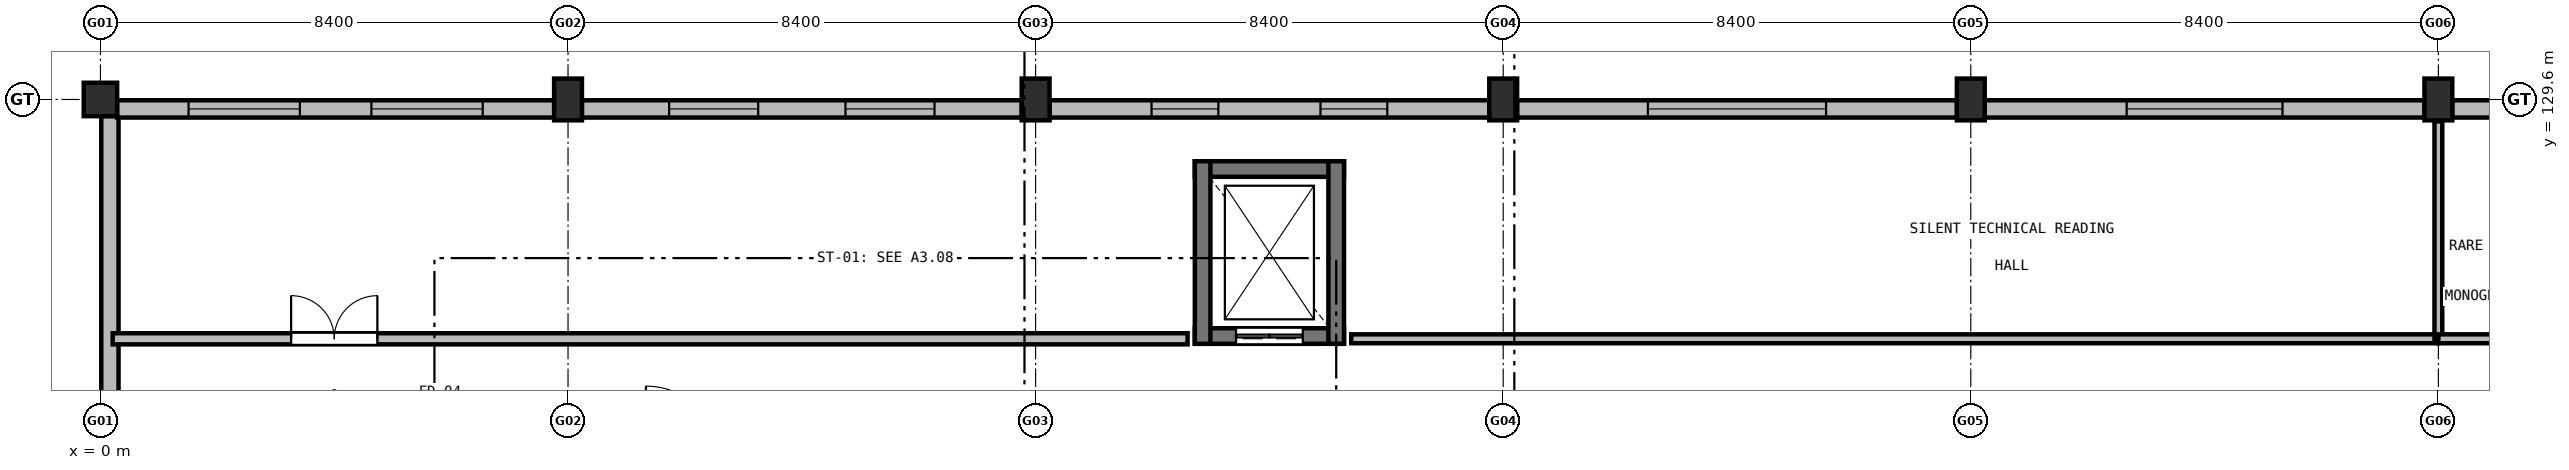
"""IFC4 building model, lengths in metres.
Left out: names, types, materials, properties, quantities, classifications, styles, units other than length and angle.
Written with IfcOpenShell. Run it as: python <this file> out.ifc"""

import sys

from ifc_helpers import new_model, si_unit, direction, frame, frame_2d, origin, origin_2d, place, context, subcontext, project, spatial, rectangle, extrude, element, fill, save


model = new_model("IFC4")
c1 = context("Model", 3, precision=1e-05, world=origin(), true_north=direction((0.0, 1.0)))
c2 = subcontext(c1, "Body", "Model", "MODEL_VIEW")
j1 = project(units=[si_unit("LENGTHUNIT", "METRE"), si_unit("PLANEANGLEUNIT", "RADIAN")], contexts=[c1])
p1 = place(None, origin())
s1 = spatial("IfcSite", under=j1, at=p1, CompositionType="ELEMENT")
p2 = place(p1, origin())
s2 = spatial("IfcBuilding", under=s1, at=p2, CompositionType="ELEMENT")
p3 = place(p2, frame((0.0, 0.0, 17.7)))
s3 = spatial("IfcBuildingStorey", under=s2, at=p3, CompositionType="ELEMENT", Elevation=17.7)
p4 = place(p3, frame((0.0, 129.6, 0.0), z_axis=(0.0, 0.0, 1.0), x_axis=(1.0, 0.0, 0.0)))
e1 = element("IfcColumn", 1, at=p4, inside=s3, PredefinedType="COLUMN", context=c2, shape_type="SweptSolid", body=[
    extrude(rectangle(XDim=0.6, YDim=0.6, at=origin_2d()), origin(), (0.0, 0.0, 1.0), 4.2),
])
for number, where, z_axis, x_axis in (
    (2, (8.4, 129.6, 0.0), (0.0, 0.0, 1.0), (1.0, 0.0, 0.0)),
    (3, (16.8, 129.6, 0.0), (0.0, 0.0, 1.0), (1.0, 0.0, 0.0)),
    (4, (25.2, 129.6, 0.0), (0.0, 0.0, 1.0), (1.0, 0.0, 0.0)),
    (5, (33.6, 129.6, 0.0), (0.0, 0.0, 1.0), (1.0, 0.0, 0.0)),
    (6, (42.0, 129.6, 0.0), (0.0, 0.0, 1.0), (1.0, 0.0, 0.0)),
):
    element("IfcColumn", number, at=place(p3, frame(where, z_axis=z_axis, x_axis=x_axis)), inside=s3, PredefinedType="COLUMN", context=c2, shape_type="SweptSolid", body=[
        extrude(rectangle(XDim=0.5, YDim=0.75, at=origin_2d()), origin(), (0.0, 0.0, 1.0), 4.2),
    ])
p5 = place(p3, frame((0.17, 122.698, 0.0), z_axis=(0.0, 0.0, 1.0), x_axis=(0.0, 1.0, 0.0)))
e7 = element("IfcWall", 7, at=p5, inside=s3, PredefinedType="SOLIDWALL", context=c2, shape_type="SweptSolid", body=[
    extrude(rectangle(XDim=6.604, YDim=0.31, at=frame_2d((3.302, 0.0))), origin(), (0.0, 0.0, 1.0), 3.36),
])
p6 = place(p3, frame((0.298, 129.43, 0.0), z_axis=(0.0, 0.0, 1.0), x_axis=(1.0, 0.0, 0.0)))
e8 = element("IfcWall", 8, at=p6, inside=s3, PredefinedType="SOLIDWALL", context=c2, shape_type="SweptSolid", body=[
    extrude(rectangle(XDim=7.854, YDim=0.31, at=frame_2d((3.927, 0.0))), origin(), (0.0, 0.0, 1.0), 3.25),
])
p7 = place(p6, frame((1.285, 0.0, 0.95)))
e9 = element("IfcOpeningElement", 9, at=p7, cuts=e8, PredefinedType="OPENING", context=c2, shape_type="SweptSolid", body=[
    extrude(rectangle(XDim=2.0, YDim=2.0, at=frame_2d((1.0, 1.0))), frame((0.0, 0.165, 0.0), z_axis=(0.0, -1.0, 0.0), x_axis=(1.0, 0.0, 0.0)), (0.0, 0.0, 1.0), 0.33),
])
p8 = place(p6, frame((4.569, 0.0, 0.95)))
e10 = element("IfcOpeningElement", 10, at=p8, cuts=e8, PredefinedType="OPENING", context=c2, shape_type="SweptSolid", body=[
    extrude(rectangle(XDim=2.0, YDim=2.0, at=frame_2d((1.0, 1.0))), frame((0.0, 0.165, 0.0), z_axis=(0.0, -1.0, 0.0), x_axis=(1.0, 0.0, 0.0)), (0.0, 0.0, 1.0), 0.33),
])
p9 = place(p3, frame((8.648, 129.43, 0.0), z_axis=(0.0, 0.0, 1.0), x_axis=(1.0, 0.0, 0.0)))
e11 = element("IfcWall", 11, at=p9, inside=s3, PredefinedType="SOLIDWALL", context=c2, shape_type="SweptSolid", body=[
    extrude(rectangle(XDim=7.904, YDim=0.31, at=frame_2d((3.952, 0.0))), origin(), (0.0, 0.0, 1.0), 3.25),
])
p10 = place(p9, frame((1.568, 0.0, 0.95)))
e12 = element("IfcOpeningElement", 12, at=p10, cuts=e11, PredefinedType="OPENING", context=c2, shape_type="SweptSolid", body=[
    extrude(rectangle(XDim=1.6, YDim=1.9, at=frame_2d((0.8, 0.95))), frame((0.0, 0.165, 0.0), z_axis=(0.0, -1.0, 0.0), x_axis=(1.0, 0.0, 0.0)), (0.0, 0.0, 1.0), 0.33),
])
p11 = place(p9, frame((4.736, 0.0, 0.95)))
e13 = element("IfcOpeningElement", 13, at=p11, cuts=e11, PredefinedType="OPENING", context=c2, shape_type="SweptSolid", body=[
    extrude(rectangle(XDim=1.6, YDim=1.9, at=frame_2d((0.8, 0.95))), frame((0.0, 0.165, 0.0), z_axis=(0.0, -1.0, 0.0), x_axis=(1.0, 0.0, 0.0)), (0.0, 0.0, 1.0), 0.33),
])
p12 = place(p3, frame((17.048, 129.43, 0.0), z_axis=(0.0, 0.0, 1.0), x_axis=(1.0, 0.0, 0.0)))
e14 = element("IfcWall", 14, at=p12, inside=s3, PredefinedType="SOLIDWALL", context=c2, shape_type="SweptSolid", body=[
    extrude(rectangle(XDim=7.904, YDim=0.31, at=frame_2d((3.952, 0.0))), origin(), (0.0, 0.0, 1.0), 3.25),
])
p13 = place(p12, frame((1.835, 0.0, 0.95)))
e15 = element("IfcOpeningElement", 15, at=p13, cuts=e14, PredefinedType="OPENING", context=c2, shape_type="SweptSolid", body=[
    extrude(rectangle(XDim=1.2, YDim=1.8, at=frame_2d((0.6, 0.9))), frame((0.0, 0.165, 0.0), z_axis=(0.0, -1.0, 0.0), x_axis=(1.0, 0.0, 0.0)), (0.0, 0.0, 1.0), 0.33),
])
p14 = place(p12, frame((4.869, 0.0, 0.95)))
e16 = element("IfcOpeningElement", 16, at=p14, cuts=e14, PredefinedType="OPENING", context=c2, shape_type="SweptSolid", body=[
    extrude(rectangle(XDim=1.2, YDim=1.8, at=frame_2d((0.6, 0.9))), frame((0.0, 0.165, 0.0), z_axis=(0.0, -1.0, 0.0), x_axis=(1.0, 0.0, 0.0)), (0.0, 0.0, 1.0), 0.33),
])
p15 = place(p3, frame((25.448, 129.43, 0.0), z_axis=(0.0, 0.0, 1.0), x_axis=(1.0, 0.0, 0.0)))
e17 = element("IfcWall", 17, at=p15, inside=s3, PredefinedType="SOLIDWALL", context=c2, shape_type="SweptSolid", body=[
    extrude(rectangle(XDim=7.904, YDim=0.31, at=frame_2d((3.952, 0.0))), origin(), (0.0, 0.0, 1.0), 3.25),
])
p16 = place(p15, frame((2.352, 0.0, 0.95)))
e18 = element("IfcOpeningElement", 18, at=p16, cuts=e17, PredefinedType="OPENING", context=c2, shape_type="SweptSolid", body=[
    extrude(rectangle(XDim=3.2, YDim=2.05, at=frame_2d((1.6, 1.025))), frame((0.0, 0.165, 0.0), z_axis=(0.0, -1.0, 0.0), x_axis=(1.0, 0.0, 0.0)), (0.0, 0.0, 1.0), 0.33),
])
p17 = place(p3, frame((33.848, 129.43, 0.0), z_axis=(0.0, 0.0, 1.0), x_axis=(1.0, 0.0, 0.0)))
e19 = element("IfcWall", 19, at=p17, inside=s3, PredefinedType="SOLIDWALL", context=c2, shape_type="SweptSolid", body=[
    extrude(rectangle(XDim=7.904, YDim=0.31, at=frame_2d((3.952, 0.0))), origin(), (0.0, 0.0, 1.0), 3.25),
])
p18 = place(p17, frame((2.552, 0.0, 0.95)))
e20 = element("IfcOpeningElement", 20, at=p18, cuts=e19, PredefinedType="OPENING", context=c2, shape_type="SweptSolid", body=[
    extrude(rectangle(XDim=2.8, YDim=2.0, at=frame_2d((1.4, 1.0))), frame((0.0, 0.165, 0.0), z_axis=(0.0, -1.0, 0.0), x_axis=(1.0, 0.0, 0.0)), (0.0, 0.0, 1.0), 0.33),
])
p19 = place(p3, frame((42.248, 129.43, 0.0), z_axis=(0.0, 0.0, 1.0), x_axis=(1.0, 0.0, 0.0)))
e21 = element("IfcWall", 21, at=p19, inside=s3, PredefinedType="SOLIDWALL", context=c2, shape_type="SweptSolid", body=[
    extrude(rectangle(XDim=7.904, YDim=0.31, at=frame_2d((3.952, 0.0))), origin(), (0.0, 0.0, 1.0), 3.25),
])
p20 = place(p19, frame((0.901, 0.0, 0.95)))
e22 = element("IfcOpeningElement", 22, at=p20, cuts=e21, PredefinedType="OPENING", context=c2, shape_type="SweptSolid", body=[
    extrude(rectangle(XDim=2.6, YDim=1.8, at=frame_2d((1.3, 0.9))), frame((0.0, 0.165, 0.0), z_axis=(0.0, -1.0, 0.0), x_axis=(1.0, 0.0, 0.0)), (0.0, 0.0, 1.0), 0.33),
])
p21 = place(p19, frame((4.403, 0.0, 0.95)))
e23 = element("IfcOpeningElement", 23, at=p21, cuts=e21, PredefinedType="OPENING", context=c2, shape_type="SweptSolid", body=[
    extrude(rectangle(XDim=2.6, YDim=1.8, at=frame_2d((1.3, 0.9))), frame((0.0, 0.165, 0.0), z_axis=(0.0, -1.0, 0.0), x_axis=(1.0, 0.0, 0.0)), (0.0, 0.0, 1.0), 0.33),
])
p22 = place(p3, frame((22.34, 125.35, 0.0), z_axis=(0.0, 0.0, 1.0), x_axis=(-1.0, 0.0, 0.0)))
e24 = element("IfcWall", 24, at=p22, inside=s3, PredefinedType="SHEAR", context=c2, shape_type="SweptSolid", body=[
    extrude(rectangle(XDim=2.68, YDim=0.28, at=frame_2d((1.34, 0.0))), origin(), (0.0, 0.0, 1.0), 3.88),
])
p23 = place(p22, frame((0.74, 0.0, 0.0)))
e25 = element("IfcOpeningElement", 25, at=p23, cuts=e24, PredefinedType="OPENING", context=c2, shape_type="SweptSolid", body=[
    extrude(rectangle(XDim=1.2, YDim=2.15, at=frame_2d((0.6, 1.075))), frame((0.0, 0.15, 0.0), z_axis=(0.0, -1.0, 0.0), x_axis=(1.0, 0.0, 0.0)), (0.0, 0.0, 1.0), 0.3),
])
p24 = place(p3, frame((19.66, 128.35, 0.0), z_axis=(0.0, 0.0, 1.0), x_axis=(1.0, 0.0, 0.0)))
e26 = element("IfcWall", 26, at=p24, inside=s3, PredefinedType="SHEAR", context=c2, shape_type="SweptSolid", body=[
    extrude(rectangle(XDim=2.68, YDim=0.28, at=frame_2d((1.34, 0.0))), origin(), (0.0, 0.0, 1.0), 3.88),
])
for number, where, z_axis, x_axis in (
    (27, (19.8, 125.21, 0.0), (0.0, 0.0, 1.0), (0.0, 1.0, 0.0)),
    (28, (22.2, 128.49, 0.0), (0.0, 0.0, 1.0), (0.0, -1.0, 0.0)),
):
    element("IfcWall", number, at=place(p3, frame(where, z_axis=z_axis, x_axis=x_axis)), inside=s3, PredefinedType="SHEAR", context=c2, shape_type="SweptSolid", body=[
        extrude(rectangle(XDim=3.28, YDim=0.28, at=frame_2d((1.64, 0.0))), origin(), (0.0, 0.0, 1.0), 3.88),
    ])
p25 = place(p3, frame((0.22, 125.3, 0.0), z_axis=(0.0, 0.0, 1.0), x_axis=(1.0, 0.0, 0.0)))
e29 = element("IfcWall", 29, at=p25, inside=s3, PredefinedType="SOLIDWALL", context=c2, shape_type="SweptSolid", body=[
    extrude(rectangle(XDim=19.31, YDim=0.2, at=frame_2d((9.655, 0.0))), origin(), (0.0, 0.0, 1.0), 3.355),
])
p26 = place(p25, frame((3.205, 0.0, 0.0)))
e30 = element("IfcOpeningElement", 30, at=p26, cuts=e29, PredefinedType="OPENING", context=c2, shape_type="SweptSolid", body=[
    extrude(rectangle(XDim=1.55, YDim=2.2, at=frame_2d((0.775, 1.1))), frame((0.0, 0.11, 0.0), z_axis=(0.0, -1.0, 0.0), x_axis=(1.0, 0.0, 0.0)), (0.0, 0.0, 1.0), 0.22),
])
p27 = place(p3, frame((22.47, 125.3, 0.0), z_axis=(0.0, 0.0, 1.0), x_axis=(1.0, 0.0, 0.0)))
e31 = element("IfcWall", 31, at=p27, inside=s3, PredefinedType="PARTITIONING", context=c2, shape_type="SweptSolid", body=[
    extrude(rectangle(XDim=19.53, YDim=0.16, at=frame_2d((9.765, 0.0))), origin(), (0.0, 0.0, 1.0), 3.355),
])
p28 = place(p3, frame((42.0, 125.3, 0.0), z_axis=(0.0, 0.0, 1.0), x_axis=(0.0, 1.0, 0.0)))
e32 = element("IfcWall", 32, at=p28, inside=s3, PredefinedType="PARTITIONING", context=c2, shape_type="SweptSolid", body=[
    extrude(rectangle(XDim=3.905, YDim=0.14, at=frame_2d((1.953, 0.0))), origin(), (0.0, 0.0, 1.0), 3.245),
])
p29 = place(p3, frame((42.0, 125.3, 0.0), z_axis=(0.0, 0.0, 1.0), x_axis=(1.0, 0.0, 0.0)))
e33 = element("IfcWall", 33, at=p29, inside=s3, PredefinedType="PARTITIONING", context=c2, shape_type="SweptSolid", body=[
    extrude(rectangle(XDim=11.13, YDim=0.16, at=frame_2d((5.565, 0.0))), origin(), (0.0, 0.0, 1.0), 3.355),
])
p30 = place(p29, frame((3.6, 0.0, 0.0)))
e34 = element("IfcOpeningElement", 34, at=p30, cuts=e33, PredefinedType="OPENING", context=c2, shape_type="SweptSolid", body=[
    extrude(rectangle(XDim=1.2, YDim=2.15, at=frame_2d((0.6, 1.075))), frame((0.0, 0.09, 0.0), z_axis=(0.0, -1.0, 0.0), x_axis=(1.0, 0.0, 0.0)), (0.0, 0.0, 1.0), 0.18),
])
p31 = place(p7, origin())
e35 = element("IfcWindow", 35, at=p31, inside=s3, PartitioningType="SINGLE_PANEL", PredefinedType="WINDOW", context=c2, shape_type="SweptSolid", body=[
    extrude(rectangle(XDim=2.0, YDim=2.0, at=frame_2d((1.0, 1.0))), frame((0.0, 0.03, 0.0), z_axis=(0.0, -1.0, 0.0), x_axis=(1.0, 0.0, 0.0)), (0.0, 0.0, 1.0), 0.06),
])
fill(e9, e35)
p32 = place(p8, origin())
e36 = element("IfcWindow", 36, at=p32, inside=s3, PartitioningType="SINGLE_PANEL", PredefinedType="WINDOW", context=c2, shape_type="SweptSolid", body=[
    extrude(rectangle(XDim=2.0, YDim=2.0, at=frame_2d((1.0, 1.0))), frame((0.0, 0.03, 0.0), z_axis=(0.0, -1.0, 0.0), x_axis=(1.0, 0.0, 0.0)), (0.0, 0.0, 1.0), 0.06),
])
fill(e10, e36)
p33 = place(p10, origin())
e37 = element("IfcWindow", 37, at=p33, inside=s3, PartitioningType="SINGLE_PANEL", PredefinedType="WINDOW", context=c2, shape_type="SweptSolid", body=[
    extrude(rectangle(XDim=1.6, YDim=1.9, at=frame_2d((0.8, 0.95))), frame((0.0, 0.03, 0.0), z_axis=(0.0, -1.0, 0.0), x_axis=(1.0, 0.0, 0.0)), (0.0, 0.0, 1.0), 0.06),
])
fill(e12, e37)
p34 = place(p11, origin())
e38 = element("IfcWindow", 38, at=p34, inside=s3, PartitioningType="SINGLE_PANEL", PredefinedType="WINDOW", context=c2, shape_type="SweptSolid", body=[
    extrude(rectangle(XDim=1.6, YDim=1.9, at=frame_2d((0.8, 0.95))), frame((0.0, 0.03, 0.0), z_axis=(0.0, -1.0, 0.0), x_axis=(1.0, 0.0, 0.0)), (0.0, 0.0, 1.0), 0.06),
])
fill(e13, e38)
p35 = place(p13, origin())
e39 = element("IfcWindow", 39, at=p35, inside=s3, PartitioningType="SINGLE_PANEL", PredefinedType="WINDOW", context=c2, shape_type="SweptSolid", body=[
    extrude(rectangle(XDim=1.2, YDim=1.8, at=frame_2d((0.6, 0.9))), frame((0.0, 0.03, 0.0), z_axis=(0.0, -1.0, 0.0), x_axis=(1.0, 0.0, 0.0)), (0.0, 0.0, 1.0), 0.06),
])
fill(e15, e39)
p36 = place(p14, origin())
e40 = element("IfcWindow", 40, at=p36, inside=s3, PartitioningType="SINGLE_PANEL", PredefinedType="WINDOW", context=c2, shape_type="SweptSolid", body=[
    extrude(rectangle(XDim=1.2, YDim=1.8, at=frame_2d((0.6, 0.9))), frame((0.0, 0.03, 0.0), z_axis=(0.0, -1.0, 0.0), x_axis=(1.0, 0.0, 0.0)), (0.0, 0.0, 1.0), 0.06),
])
fill(e16, e40)
p37 = place(p16, origin())
e41 = element("IfcWindow", 41, at=p37, inside=s3, PartitioningType="SINGLE_PANEL", PredefinedType="WINDOW", context=c2, shape_type="SweptSolid", body=[
    extrude(rectangle(XDim=3.2, YDim=2.05, at=frame_2d((1.6, 1.025))), frame((0.0, 0.03, 0.0), z_axis=(0.0, -1.0, 0.0), x_axis=(1.0, 0.0, 0.0)), (0.0, 0.0, 1.0), 0.06),
])
fill(e18, e41)
p38 = place(p18, origin())
e42 = element("IfcWindow", 42, at=p38, inside=s3, PartitioningType="SINGLE_PANEL", PredefinedType="WINDOW", context=c2, shape_type="SweptSolid", body=[
    extrude(rectangle(XDim=2.8, YDim=2.0, at=frame_2d((1.4, 1.0))), frame((0.0, 0.03, 0.0), z_axis=(0.0, -1.0, 0.0), x_axis=(1.0, 0.0, 0.0)), (0.0, 0.0, 1.0), 0.06),
])
fill(e20, e42)
p39 = place(p23, origin())
e43 = element("IfcDoor", 43, at=p39, inside=s3, OperationType="DOUBLE_DOOR_SLIDING", PredefinedType="DOOR", context=c2, shape_type="SweptSolid", body=[
    extrude(rectangle(XDim=1.2, YDim=2.15, at=frame_2d((0.6, 1.075))), frame((0.0, 0.025, 0.0), z_axis=(0.0, -1.0, 0.0), x_axis=(1.0, 0.0, 0.0)), (0.0, 0.0, 1.0), 0.05),
])
fill(e25, e43)
p40 = place(p26, origin())
e44 = element("IfcDoor", 44, at=p40, inside=s3, OperationType="DOUBLE_DOOR_SINGLE_SWING", PredefinedType="DOOR", context=c2, shape_type="SweptSolid", body=[
    extrude(rectangle(XDim=1.55, YDim=2.2, at=frame_2d((0.775, 1.1))), frame((0.0, 0.025, 0.0), z_axis=(0.0, -1.0, 0.0), x_axis=(1.0, 0.0, 0.0)), (0.0, 0.0, 1.0), 0.05),
])
fill(e30, e44)
save(model, sys.argv[1])
